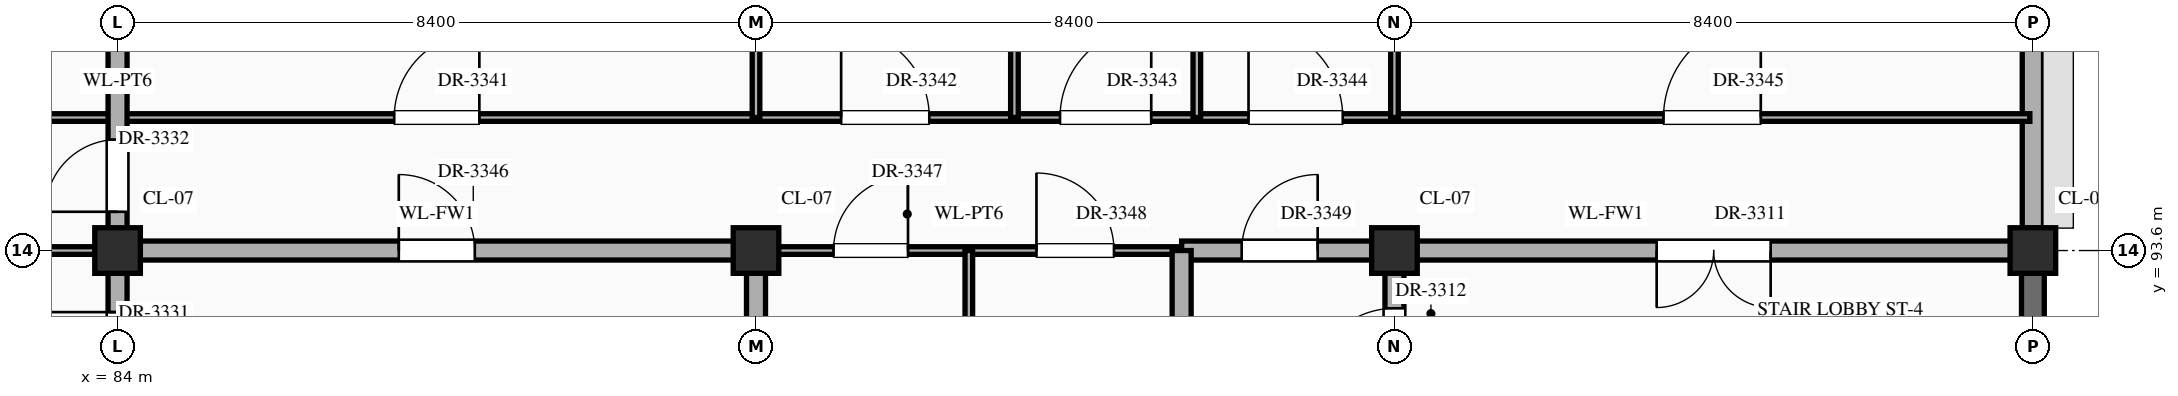
"""IFC4 building model, lengths in metres.
Left out: names, types, materials, properties, quantities, classifications, styles, units other than length and angle.
Written with IfcOpenShell. Run it as: python <this file> out.ifc"""

import sys

from ifc_helpers import new_model, si_unit, direction, frame, frame_2d, origin, origin_2d, place, context, subcontext, project, spatial, rectangle, extrude, element, fill, save


model = new_model("IFC4")
c1 = context("Model", 3, precision=1e-05, world=origin(), true_north=direction((0.0, 1.0)))
c2 = subcontext(c1, "Body", "Model", "MODEL_VIEW")
j1 = project(units=[si_unit("LENGTHUNIT", "METRE"), si_unit("PLANEANGLEUNIT", "RADIAN")], contexts=[c1])
p1 = place(None, origin())
s1 = spatial("IfcSite", under=j1, at=p1, CompositionType="ELEMENT")
p2 = place(p1, origin())
s2 = spatial("IfcBuilding", under=s1, at=p2, CompositionType="ELEMENT")
p3 = place(p2, frame((0.0, 0.0, 64.5)))
s3 = spatial("IfcBuildingStorey", under=s2, at=p3, CompositionType="ELEMENT", Elevation=64.5)
for number, where, z_axis, x_axis in (
    (1, (84.0, 93.6, 0.0), (0.0, 0.0, 1.0), (1.0, 0.0, 0.0)),
    (2, (92.4, 93.6, 0.0), (0.0, 0.0, 1.0), (1.0, 0.0, 0.0)),
    (3, (100.8, 93.6, 0.0), (0.0, 0.0, 1.0), (1.0, 0.0, 0.0)),
    (4, (109.2, 93.6, 0.0), (0.0, 0.0, 1.0), (1.0, 0.0, 0.0)),
):
    element("IfcColumn", number, at=place(p3, frame(where, z_axis=z_axis, x_axis=x_axis)), inside=s3, PredefinedType="COLUMN", context=c2, shape_type="SweptSolid", body=[
        extrude(rectangle(XDim=0.6, YDim=0.6, at=origin_2d()), origin(), (0.0, 0.0, 1.0), 4.2),
    ])
p4 = place(p3, frame((109.2, 86.695, 0.0), z_axis=(0.0, 0.0, 1.0), x_axis=(0.0, 1.0, 0.0)))
e5 = element("IfcWall", 5, at=p4, inside=s3, PredefinedType="SHEAR", context=c2, shape_type="SweptSolid", body=[
    extrude(rectangle(XDim=6.61, YDim=0.3, at=frame_2d((3.305, 0.0))), origin(), (0.0, 0.0, 1.0), 3.95),
])
p5 = place(p3, frame((109.2, 93.895, 0.0), z_axis=(0.0, 0.0, 1.0), x_axis=(0.0, 1.0, 0.0)))
e6 = element("IfcWall", 6, at=p5, inside=s3, PredefinedType="STANDARD", context=c2, shape_type="SweptSolid", body=[
    extrude(rectangle(XDim=6.61, YDim=0.28, at=frame_2d((3.305, 0.0))), origin(), (0.0, 0.0, 1.0), 3.3),
])
p6 = place(p5, frame((4.08, 0.0, 0.85)))
e7 = element("IfcOpeningElement", 7, at=p6, cuts=e6, PredefinedType="OPENING", context=c2, shape_type="SweptSolid", body=[
    extrude(rectangle(XDim=1.05, YDim=2.12, at=frame_2d((0.525, 1.06))), frame((0.0, 0.152, 0.0), z_axis=(0.0, -1.0, 0.0), x_axis=(1.0, 0.0, 0.0)), (0.0, 0.0, 1.0), 0.304),
])
p7 = place(p3, frame((75.6, 93.6, 0.0), z_axis=(0.0, 0.0, 1.0), x_axis=(1.0, 0.0, 0.0)))
e8 = element("IfcWall", 8, at=p7, inside=s3, PredefinedType="STANDARD", context=c2, shape_type="SweptSolid", body=[
    extrude(rectangle(XDim=8.4, YDim=0.1, at=frame_2d((4.2, 0.0))), origin(), (0.0, 0.0, 1.0), 3.1),
])
p8 = place(p7, frame((3.425, 0.0, 0.0)))
e9 = element("IfcOpeningElement", 9, at=p8, cuts=e8, PredefinedType="OPENING", context=c2, shape_type="SweptSolid", body=[
    extrude(rectangle(XDim=1.55, YDim=2.35, at=frame_2d((0.775, 1.175))), frame((0.0, 0.062, 0.0), z_axis=(0.0, -1.0, 0.0), x_axis=(1.0, 0.0, 0.0)), (0.0, 0.0, 1.0), 0.124),
])
p9 = place(p3, frame((84.0, 93.6, 0.0), z_axis=(0.0, 0.0, 1.0), x_axis=(1.0, 0.0, 0.0)))
e10 = element("IfcWall", 10, at=p9, inside=s3, PredefinedType="STANDARD", context=c2, shape_type="SweptSolid", body=[
    extrude(rectangle(XDim=8.4, YDim=0.25, at=frame_2d((4.2, 0.0))), origin(), (0.0, 0.0, 1.0), 3.1),
])
p10 = place(p9, frame((3.7, 0.0, 0.0)))
e11 = element("IfcOpeningElement", 11, at=p10, cuts=e10, PredefinedType="OPENING", context=c2, shape_type="SweptSolid", body=[
    extrude(rectangle(XDim=1.0, YDim=2.2, at=frame_2d((0.5, 1.1))), frame((0.0, 0.137, 0.0), z_axis=(0.0, -1.0, 0.0), x_axis=(1.0, 0.0, 0.0)), (0.0, 0.0, 1.0), 0.274),
])
p11 = place(p3, frame((92.4, 93.6, 0.0), z_axis=(0.0, 0.0, 1.0), x_axis=(1.0, 0.0, 0.0)))
e12 = element("IfcWall", 12, at=p11, inside=s3, PredefinedType="STANDARD", context=c2, shape_type="SweptSolid", body=[
    extrude(rectangle(XDim=5.6, YDim=0.1, at=frame_2d((2.8, 0.0))), origin(), (0.0, 0.0, 1.0), 3.1),
])
p12 = place(p11, frame((1.02, 0.0, 0.0)))
e13 = element("IfcOpeningElement", 13, at=p12, cuts=e12, PredefinedType="OPENING", context=c2, shape_type="SweptSolid", body=[
    extrude(rectangle(XDim=0.98, YDim=2.35, at=frame_2d((0.49, 1.175))), frame((0.0, 0.062, 0.0), z_axis=(0.0, -1.0, 0.0), x_axis=(1.0, 0.0, 0.0)), (0.0, 0.0, 1.0), 0.124),
])
p13 = place(p11, frame((3.69, 0.0, 0.0)))
e14 = element("IfcOpeningElement", 14, at=p13, cuts=e12, PredefinedType="OPENING", context=c2, shape_type="SweptSolid", body=[
    extrude(rectangle(XDim=1.02, YDim=2.4, at=frame_2d((0.51, 1.2))), frame((0.0, 0.062, 0.0), z_axis=(0.0, -1.0, 0.0), x_axis=(1.0, 0.0, 0.0)), (0.0, 0.0, 1.0), 0.124),
])
p14 = place(p3, frame((98.0, 93.6, 0.0), z_axis=(0.0, 0.0, 1.0), x_axis=(1.0, 0.0, 0.0)))
e15 = element("IfcWall", 15, at=p14, inside=s3, PredefinedType="STANDARD", context=c2, shape_type="SweptSolid", body=[
    extrude(rectangle(XDim=11.16, YDim=0.25, at=frame_2d((5.58, 0.0))), origin(), (0.0, 0.0, 1.0), 3.1),
])
p15 = place(p14, frame((6.25, 0.0, 0.0)))
e16 = element("IfcOpeningElement", 16, at=p15, cuts=e15, PredefinedType="OPENING", context=c2, shape_type="SweptSolid", body=[
    extrude(rectangle(XDim=1.5, YDim=2.25, at=frame_2d((0.75, 1.125))), frame((0.0, 0.137, 0.0), z_axis=(0.0, -1.0, 0.0), x_axis=(1.0, 0.0, 0.0)), (0.0, 0.0, 1.0), 0.274),
])
p16 = place(p14, frame((0.79, 0.0, 0.0)))
e17 = element("IfcOpeningElement", 17, at=p16, cuts=e15, PredefinedType="OPENING", context=c2, shape_type="SweptSolid", body=[
    extrude(rectangle(XDim=1.0, YDim=2.2, at=frame_2d((0.5, 1.1))), frame((0.0, 0.137, 0.0), z_axis=(0.0, -1.0, 0.0), x_axis=(1.0, 0.0, 0.0)), (0.0, 0.0, 1.0), 0.274),
])
p17 = place(p3, frame((58.84, 95.35, 0.0), z_axis=(0.0, 0.0, 1.0), x_axis=(1.0, 0.0, 0.0)))
e18 = element("IfcWall", 18, at=p17, inside=s3, PredefinedType="STANDARD", context=c2, shape_type="SweptSolid", body=[
    extrude(rectangle(XDim=50.32, YDim=0.1, at=frame_2d((25.16, 0.0))), origin(), (0.0, 0.0, 1.0), 3.95),
])
p18 = place(p17, frame((3.61, 0.0, 0.0)))
e19 = element("IfcOpeningElement", 19, at=p18, cuts=e18, PredefinedType="OPENING", context=c2, shape_type="SweptSolid", body=[
    extrude(rectangle(XDim=1.14, YDim=2.4, at=frame_2d((0.57, 1.2))), frame((0.0, 0.062, 0.0), z_axis=(0.0, -1.0, 0.0), x_axis=(1.0, 0.0, 0.0)), (0.0, 0.0, 1.0), 0.124),
])
p19 = place(p17, frame((9.61, 0.0, 0.0)))
e20 = element("IfcOpeningElement", 20, at=p19, cuts=e18, PredefinedType="OPENING", context=c2, shape_type="SweptSolid", body=[
    extrude(rectangle(XDim=0.9, YDim=2.15, at=frame_2d((0.45, 1.075))), frame((0.0, 0.062, 0.0), z_axis=(0.0, -1.0, 0.0), x_axis=(1.0, 0.0, 0.0)), (0.0, 0.0, 1.0), 0.124),
])
p20 = place(p17, frame((12.53, 0.0, 0.0)))
e21 = element("IfcOpeningElement", 21, at=p20, cuts=e18, PredefinedType="OPENING", context=c2, shape_type="SweptSolid", body=[
    extrude(rectangle(XDim=0.86, YDim=2.1, at=frame_2d((0.43, 1.05))), frame((0.0, 0.062, 0.0), z_axis=(0.0, -1.0, 0.0), x_axis=(1.0, 0.0, 0.0)), (0.0, 0.0, 1.0), 0.124),
])
p21 = place(p17, frame((15.0, 0.0, 0.0)))
e22 = element("IfcOpeningElement", 22, at=p21, cuts=e18, PredefinedType="OPENING", context=c2, shape_type="SweptSolid", body=[
    extrude(rectangle(XDim=0.92, YDim=2.15, at=frame_2d((0.46, 1.075))), frame((0.0, 0.062, 0.0), z_axis=(0.0, -1.0, 0.0), x_axis=(1.0, 0.0, 0.0)), (0.0, 0.0, 1.0), 0.124),
])
p22 = place(p17, frame((20.48, 0.0, 0.0)))
e23 = element("IfcOpeningElement", 23, at=p22, cuts=e18, PredefinedType="OPENING", context=c2, shape_type="SweptSolid", body=[
    extrude(rectangle(XDim=0.96, YDim=2.2, at=frame_2d((0.48, 1.1))), frame((0.0, 0.062, 0.0), z_axis=(0.0, -1.0, 0.0), x_axis=(1.0, 0.0, 0.0)), (0.0, 0.0, 1.0), 0.124),
])
p23 = place(p17, frame((28.8, 0.0, 0.0)))
e24 = element("IfcOpeningElement", 24, at=p23, cuts=e18, PredefinedType="OPENING", context=c2, shape_type="SweptSolid", body=[
    extrude(rectangle(XDim=1.12, YDim=2.25, at=frame_2d((0.56, 1.125))), frame((0.0, 0.062, 0.0), z_axis=(0.0, -1.0, 0.0), x_axis=(1.0, 0.0, 0.0)), (0.0, 0.0, 1.0), 0.124),
])
p24 = place(p17, frame((34.68, 0.0, 0.0)))
e25 = element("IfcOpeningElement", 25, at=p24, cuts=e18, PredefinedType="OPENING", context=c2, shape_type="SweptSolid", body=[
    extrude(rectangle(XDim=1.16, YDim=2.3, at=frame_2d((0.58, 1.15))), frame((0.0, 0.062, 0.0), z_axis=(0.0, -1.0, 0.0), x_axis=(1.0, 0.0, 0.0)), (0.0, 0.0, 1.0), 0.124),
])
p25 = place(p17, frame((37.56, 0.0, 0.0)))
e26 = element("IfcOpeningElement", 26, at=p25, cuts=e18, PredefinedType="OPENING", context=c2, shape_type="SweptSolid", body=[
    extrude(rectangle(XDim=1.2, YDim=2.35, at=frame_2d((0.6, 1.175))), frame((0.0, 0.062, 0.0), z_axis=(0.0, -1.0, 0.0), x_axis=(1.0, 0.0, 0.0)), (0.0, 0.0, 1.0), 0.124),
])
p26 = place(p17, frame((40.04, 0.0, 0.0)))
e27 = element("IfcOpeningElement", 27, at=p26, cuts=e18, PredefinedType="OPENING", context=c2, shape_type="SweptSolid", body=[
    extrude(rectangle(XDim=1.24, YDim=2.3, at=frame_2d((0.62, 1.15))), frame((0.0, 0.062, 0.0), z_axis=(0.0, -1.0, 0.0), x_axis=(1.0, 0.0, 0.0)), (0.0, 0.0, 1.0), 0.124),
])
p27 = place(p17, frame((45.5, 0.0, 0.0)))
e28 = element("IfcOpeningElement", 28, at=p27, cuts=e18, PredefinedType="OPENING", context=c2, shape_type="SweptSolid", body=[
    extrude(rectangle(XDim=1.28, YDim=2.35, at=frame_2d((0.64, 1.175))), frame((0.0, 0.062, 0.0), z_axis=(0.0, -1.0, 0.0), x_axis=(1.0, 0.0, 0.0)), (0.0, 0.0, 1.0), 0.124),
])
p28 = place(p3, frame((84.0, 79.24, 0.0), z_axis=(0.0, 0.0, 1.0), x_axis=(0.0, 1.0, 0.0)))
e29 = element("IfcWall", 29, at=p28, inside=s3, PredefinedType="STANDARD", context=c2, shape_type="SweptSolid", body=[
    extrude(rectangle(XDim=25.16, YDim=0.25, at=frame_2d((12.58, 0.0))), origin(), (0.0, 0.0, 1.0), 3.1),
])
p29 = place(p28, frame((22.72, 0.0, 0.0)))
e30 = element("IfcOpeningElement", 30, at=p29, cuts=e29, PredefinedType="OPENING", context=c2, shape_type="SweptSolid", body=[
    extrude(rectangle(XDim=1.5, YDim=2.25, at=frame_2d((0.75, 1.125))), frame((0.0, 0.137, 0.0), z_axis=(0.0, -1.0, 0.0), x_axis=(1.0, 0.0, 0.0)), (0.0, 0.0, 1.0), 0.274),
])
p30 = place(p28, frame((12.55, 0.0, 0.0)))
e31 = element("IfcOpeningElement", 31, at=p30, cuts=e29, PredefinedType="OPENING", context=c2, shape_type="SweptSolid", body=[
    extrude(rectangle(XDim=1.0, YDim=2.2, at=frame_2d((0.5, 1.1))), frame((0.0, 0.137, 0.0), z_axis=(0.0, -1.0, 0.0), x_axis=(1.0, 0.0, 0.0)), (0.0, 0.0, 1.0), 0.274),
])
p31 = place(p28, frame((14.87, 0.0, 0.0)))
e32 = element("IfcOpeningElement", 32, at=p31, cuts=e29, PredefinedType="OPENING", context=c2, shape_type="SweptSolid", body=[
    extrude(rectangle(XDim=0.95, YDim=2.15, at=frame_2d((0.475, 1.075))), frame((0.0, 0.137, 0.0), z_axis=(0.0, -1.0, 0.0), x_axis=(1.0, 0.0, 0.0)), (0.0, 0.0, 1.0), 0.274),
])
p32 = place(p28, frame((5.7, 0.0, 0.0)))
e33 = element("IfcOpeningElement", 33, at=p32, cuts=e29, PredefinedType="OPENING", context=c2, shape_type="SweptSolid", body=[
    extrude(rectangle(XDim=0.95, YDim=2.15, at=frame_2d((0.475, 1.075))), frame((0.0, 0.137, 0.0), z_axis=(0.0, -1.0, 0.0), x_axis=(1.0, 0.0, 0.0)), (0.0, 0.0, 1.0), 0.274),
])
p33 = place(p3, frame((92.4, 86.4, 0.0), z_axis=(0.0, 0.0, 1.0), x_axis=(0.0, 1.0, 0.0)))
e34 = element("IfcWall", 34, at=p33, inside=s3, PredefinedType="STANDARD", context=c2, shape_type="SweptSolid", body=[
    extrude(rectangle(XDim=7.2, YDim=0.25, at=frame_2d((3.6, 0.0))), origin(), (0.0, 0.0, 1.0), 3.2),
])
p34 = place(p3, frame((92.4, 95.35, 0.0), z_axis=(0.0, 0.0, 1.0), x_axis=(0.0, 1.0, 0.0)))
e35 = element("IfcWall", 35, at=p34, inside=s3, PredefinedType="STANDARD", context=c2, shape_type="SweptSolid", body=[
    extrude(rectangle(XDim=5.45, YDim=0.1, at=frame_2d((2.725, 0.0))), origin(), (0.0, 0.0, 1.0), 3.2),
])
p35 = place(p3, frame((95.2, 86.4, 0.0), z_axis=(0.0, 0.0, 1.0), x_axis=(0.0, 1.0, 0.0)))
e36 = element("IfcWall", 36, at=p35, inside=s3, PredefinedType="STANDARD", context=c2, shape_type="SweptSolid", body=[
    extrude(rectangle(XDim=7.2, YDim=0.1, at=frame_2d((3.6, 0.0))), origin(), (0.0, 0.0, 1.0), 3.95),
])
p36 = place(p35, frame((3.0, 0.0, 0.0)))
e37 = element("IfcOpeningElement", 37, at=p36, cuts=e36, PredefinedType="OPENING", context=c2, shape_type="SweptSolid", body=[
    extrude(rectangle(XDim=1.2, YDim=2.35, at=frame_2d((0.6, 1.175))), frame((0.0, 0.062, 0.0), z_axis=(0.0, -1.0, 0.0), x_axis=(1.0, 0.0, 0.0)), (0.0, 0.0, 1.0), 0.124),
])
p37 = place(p3, frame((95.8, 95.35, 0.0), z_axis=(0.0, 0.0, 1.0), x_axis=(0.0, 1.0, 0.0)))
e38 = element("IfcWall", 38, at=p37, inside=s3, PredefinedType="STANDARD", context=c2, shape_type="SweptSolid", body=[
    extrude(rectangle(XDim=5.45, YDim=0.1, at=frame_2d((2.725, 0.0))), origin(), (0.0, 0.0, 1.0), 3.95),
])
p38 = place(p37, frame((2.295, 0.0, 0.0)))
e39 = element("IfcOpeningElement", 39, at=p38, cuts=e38, PredefinedType="OPENING", context=c2, shape_type="SweptSolid", body=[
    extrude(rectangle(XDim=0.86, YDim=2.1, at=frame_2d((0.43, 1.05))), frame((0.0, 0.062, 0.0), z_axis=(0.0, -1.0, 0.0), x_axis=(1.0, 0.0, 0.0)), (0.0, 0.0, 1.0), 0.124),
])
p39 = place(p3, frame((98.0, 86.4, 0.0), z_axis=(0.0, 0.0, 1.0), x_axis=(0.0, 1.0, 0.0)))
e40 = element("IfcWall", 40, at=p39, inside=s3, PredefinedType="STANDARD", context=c2, shape_type="SweptSolid", body=[
    extrude(rectangle(XDim=7.2, YDim=0.25, at=frame_2d((3.6, 0.0))), origin(), (0.0, 0.0, 1.0), 3.95),
])
p40 = place(p39, frame((3.125, 0.0, 0.0)))
e41 = element("IfcOpeningElement", 41, at=p40, cuts=e40, PredefinedType="OPENING", context=c2, shape_type="SweptSolid", body=[
    extrude(rectangle(XDim=0.95, YDim=2.15, at=frame_2d((0.475, 1.075))), frame((0.0, 0.137, 0.0), z_axis=(0.0, -1.0, 0.0), x_axis=(1.0, 0.0, 0.0)), (0.0, 0.0, 1.0), 0.274),
])
p41 = place(p3, frame((98.2, 95.35, 0.0), z_axis=(0.0, 0.0, 1.0), x_axis=(0.0, 1.0, 0.0)))
e42 = element("IfcWall", 42, at=p41, inside=s3, PredefinedType="STANDARD", context=c2, shape_type="SweptSolid", body=[
    extrude(rectangle(XDim=5.45, YDim=0.1, at=frame_2d((2.725, 0.0))), origin(), (0.0, 0.0, 1.0), 3.95),
])
p42 = place(p41, frame((2.265, 0.0, 0.0)))
e43 = element("IfcOpeningElement", 43, at=p42, cuts=e42, PredefinedType="OPENING", context=c2, shape_type="SweptSolid", body=[
    extrude(rectangle(XDim=0.92, YDim=2.15, at=frame_2d((0.46, 1.075))), frame((0.0, 0.062, 0.0), z_axis=(0.0, -1.0, 0.0), x_axis=(1.0, 0.0, 0.0)), (0.0, 0.0, 1.0), 0.124),
])
p43 = place(p3, frame((100.8, 91.2, 0.0), z_axis=(0.0, 0.0, 1.0), x_axis=(0.0, 1.0, 0.0)))
e44 = element("IfcWall", 44, at=p43, inside=s3, PredefinedType="STANDARD", context=c2, shape_type="SweptSolid", body=[
    extrude(rectangle(XDim=2.4, YDim=0.25, at=frame_2d((1.2, 0.0))), origin(), (0.0, 0.0, 1.0), 3.2),
])
p44 = place(p43, frame((0.54, 0.0, 0.0)))
e45 = element("IfcOpeningElement", 45, at=p44, cuts=e44, PredefinedType="OPENING", context=c2, shape_type="SweptSolid", body=[
    extrude(rectangle(XDim=1.1, YDim=2.2, at=frame_2d((0.55, 1.1))), frame((0.0, 0.137, 0.0), z_axis=(0.0, -1.0, 0.0), x_axis=(1.0, 0.0, 0.0)), (0.0, 0.0, 1.0), 0.274),
])
p45 = place(p3, frame((100.8, 95.35, 0.0), z_axis=(0.0, 0.0, 1.0), x_axis=(0.0, 1.0, 0.0)))
e46 = element("IfcWall", 46, at=p45, inside=s3, PredefinedType="STANDARD", context=c2, shape_type="SweptSolid", body=[
    extrude(rectangle(XDim=5.45, YDim=0.1, at=frame_2d((2.725, 0.0))), origin(), (0.0, 0.0, 1.0), 3.2),
])
p46 = place(p15, frame((1.5, 0.0, 0.0), z_axis=(0.0, 0.0, 1.0), x_axis=(-1.0, 0.0, 0.0)))
e47 = element("IfcDoor", 47, at=p46, inside=s3, OperationType="DOUBLE_DOOR_SINGLE_SWING", PredefinedType="DOOR", context=c2, shape_type="SweptSolid", body=[
    extrude(rectangle(XDim=1.5, YDim=2.25, at=frame_2d((0.75, 1.125))), frame((0.0, 0.025, 0.0), z_axis=(0.0, -1.0, 0.0), x_axis=(1.0, 0.0, 0.0)), (0.0, 0.0, 1.0), 0.05),
])
fill(e16, e47)
p47 = place(p44, origin())
e48 = element("IfcDoor", 48, at=p47, inside=s3, OperationType="SINGLE_SWING_LEFT", PredefinedType="DOOR", context=c2, shape_type="SweptSolid", body=[
    extrude(rectangle(XDim=1.1, YDim=2.2, at=frame_2d((0.55, 1.1))), frame((0.0, 0.025, 0.0), z_axis=(0.0, -1.0, 0.0), x_axis=(1.0, 0.0, 0.0)), (0.0, 0.0, 1.0), 0.05),
])
fill(e45, e48)
p48 = place(p30, origin())
e49 = element("IfcDoor", 49, at=p48, inside=s3, OperationType="SINGLE_SWING_RIGHT", PredefinedType="DOOR", context=c2, shape_type="SweptSolid", body=[
    extrude(rectangle(XDim=1.0, YDim=2.2, at=frame_2d((0.5, 1.1))), frame((0.0, 0.025, 0.0), z_axis=(0.0, -1.0, 0.0), x_axis=(1.0, 0.0, 0.0)), (0.0, 0.0, 1.0), 0.05),
])
fill(e31, e49)
p49 = place(p31, origin())
e50 = element("IfcDoor", 50, at=p49, inside=s3, OperationType="SINGLE_SWING_LEFT", PredefinedType="DOOR", context=c2, shape_type="SweptSolid", body=[
    extrude(rectangle(XDim=0.95, YDim=2.15, at=frame_2d((0.475, 1.075))), frame((0.0, 0.025, 0.0), z_axis=(0.0, -1.0, 0.0), x_axis=(1.0, 0.0, 0.0)), (0.0, 0.0, 1.0), 0.05),
])
fill(e32, e50)
p50 = place(p23, origin())
e51 = element("IfcDoor", 51, at=p50, inside=s3, OperationType="SINGLE_SWING_RIGHT", PredefinedType="DOOR", context=c2, shape_type="SweptSolid", body=[
    extrude(rectangle(XDim=1.12, YDim=2.25, at=frame_2d((0.56, 1.125))), frame((0.0, 0.025, 0.0), z_axis=(0.0, -1.0, 0.0), x_axis=(1.0, 0.0, 0.0)), (0.0, 0.0, 1.0), 0.05),
])
fill(e24, e51)
p51 = place(p24, origin())
e52 = element("IfcDoor", 52, at=p51, inside=s3, OperationType="SINGLE_SWING_LEFT", PredefinedType="DOOR", context=c2, shape_type="SweptSolid", body=[
    extrude(rectangle(XDim=1.16, YDim=2.3, at=frame_2d((0.58, 1.15))), frame((0.0, 0.025, 0.0), z_axis=(0.0, -1.0, 0.0), x_axis=(1.0, 0.0, 0.0)), (0.0, 0.0, 1.0), 0.05),
])
fill(e25, e52)
p52 = place(p25, origin())
e53 = element("IfcDoor", 53, at=p52, inside=s3, OperationType="SINGLE_SWING_RIGHT", PredefinedType="DOOR", context=c2, shape_type="SweptSolid", body=[
    extrude(rectangle(XDim=1.2, YDim=2.35, at=frame_2d((0.6, 1.175))), frame((0.0, 0.025, 0.0), z_axis=(0.0, -1.0, 0.0), x_axis=(1.0, 0.0, 0.0)), (0.0, 0.0, 1.0), 0.05),
])
fill(e26, e53)
p53 = place(p26, origin())
e54 = element("IfcDoor", 54, at=p53, inside=s3, OperationType="SINGLE_SWING_LEFT", PredefinedType="DOOR", context=c2, shape_type="SweptSolid", body=[
    extrude(rectangle(XDim=1.24, YDim=2.3, at=frame_2d((0.62, 1.15))), frame((0.0, 0.025, 0.0), z_axis=(0.0, -1.0, 0.0), x_axis=(1.0, 0.0, 0.0)), (0.0, 0.0, 1.0), 0.05),
])
fill(e27, e54)
p54 = place(p27, origin())
e55 = element("IfcDoor", 55, at=p54, inside=s3, OperationType="SINGLE_SWING_RIGHT", PredefinedType="DOOR", context=c2, shape_type="SweptSolid", body=[
    extrude(rectangle(XDim=1.28, YDim=2.35, at=frame_2d((0.64, 1.175))), frame((0.0, 0.025, 0.0), z_axis=(0.0, -1.0, 0.0), x_axis=(1.0, 0.0, 0.0)), (0.0, 0.0, 1.0), 0.05),
])
fill(e28, e55)
p55 = place(p10, origin())
e56 = element("IfcDoor", 56, at=p55, inside=s3, OperationType="SINGLE_SWING_LEFT", PredefinedType="DOOR", context=c2, shape_type="SweptSolid", body=[
    extrude(rectangle(XDim=1.0, YDim=2.2, at=frame_2d((0.5, 1.1))), frame((0.0, 0.025, 0.0), z_axis=(0.0, -1.0, 0.0), x_axis=(1.0, 0.0, 0.0)), (0.0, 0.0, 1.0), 0.05),
])
fill(e11, e56)
p56 = place(p12, origin())
e57 = element("IfcDoor", 57, at=p56, inside=s3, OperationType="SINGLE_SWING_RIGHT", PredefinedType="DOOR", context=c2, shape_type="SweptSolid", body=[
    extrude(rectangle(XDim=0.98, YDim=2.35, at=frame_2d((0.49, 1.175))), frame((0.0, 0.025, 0.0), z_axis=(0.0, -1.0, 0.0), x_axis=(1.0, 0.0, 0.0)), (0.0, 0.0, 1.0), 0.05),
])
fill(e13, e57)
p57 = place(p13, origin())
e58 = element("IfcDoor", 58, at=p57, inside=s3, OperationType="SINGLE_SWING_LEFT", PredefinedType="DOOR", context=c2, shape_type="SweptSolid", body=[
    extrude(rectangle(XDim=1.02, YDim=2.4, at=frame_2d((0.51, 1.2))), frame((0.0, 0.025, 0.0), z_axis=(0.0, -1.0, 0.0), x_axis=(1.0, 0.0, 0.0)), (0.0, 0.0, 1.0), 0.05),
])
fill(e14, e58)
p58 = place(p16, origin())
e59 = element("IfcDoor", 59, at=p58, inside=s3, OperationType="SINGLE_SWING_RIGHT", PredefinedType="DOOR", context=c2, shape_type="SweptSolid", body=[
    extrude(rectangle(XDim=1.0, YDim=2.2, at=frame_2d((0.5, 1.1))), frame((0.0, 0.025, 0.0), z_axis=(0.0, -1.0, 0.0), x_axis=(1.0, 0.0, 0.0)), (0.0, 0.0, 1.0), 0.05),
])
fill(e17, e59)
save(model, sys.argv[1])
